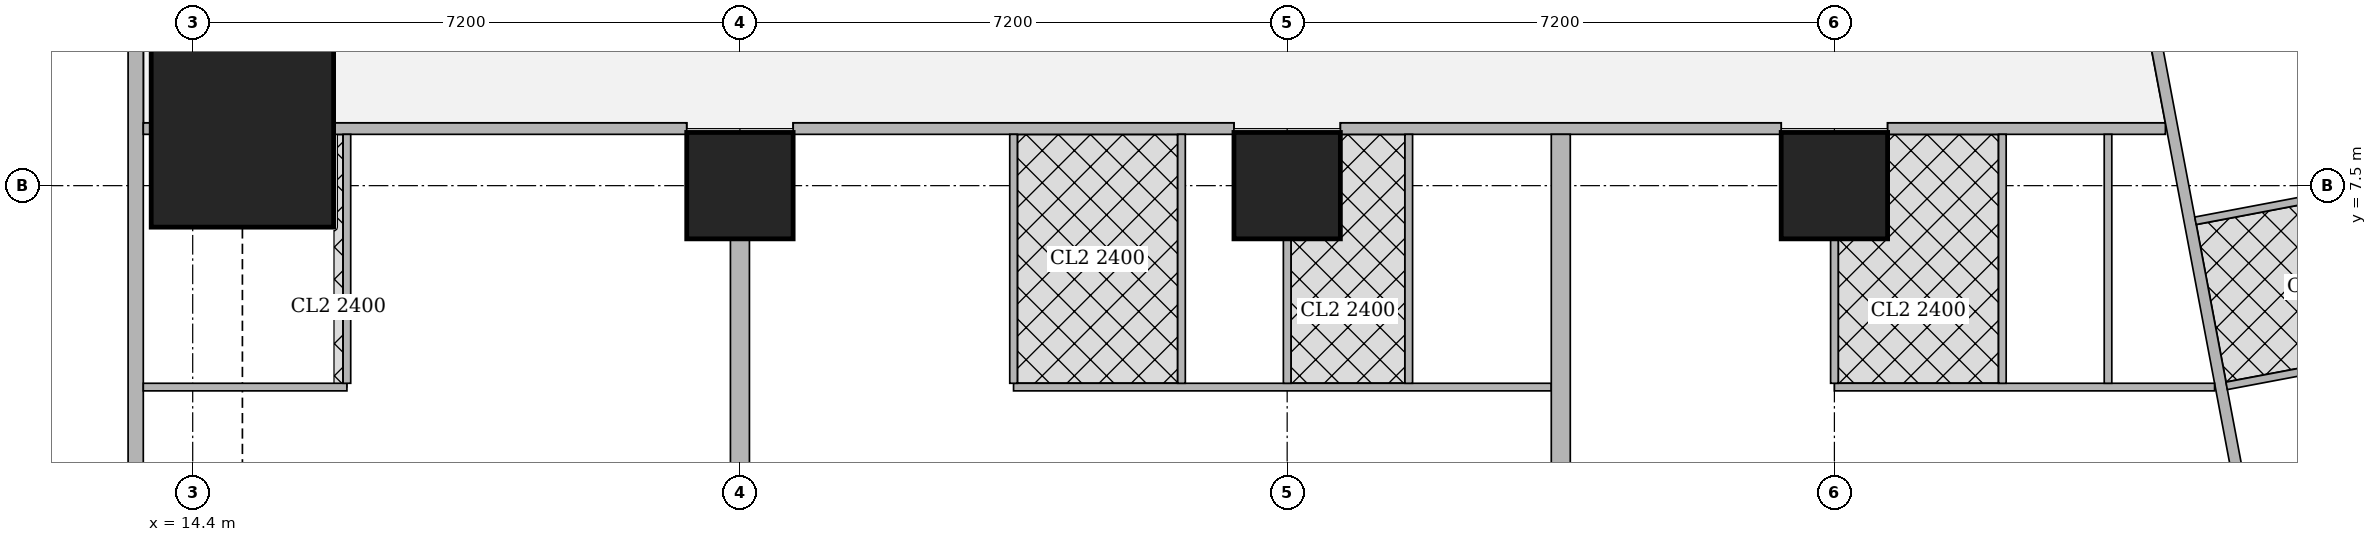
"""IFC4 building model, lengths in metres.
Left out: names, types, materials, properties, quantities, classifications, styles, units other than length and angle.
Written with IfcOpenShell. Run it as: python <this file> out.ifc"""

import sys

from ifc_helpers import new_model, si_unit, direction, frame, frame_2d, origin, origin_2d, place, context, subcontext, project, spatial, rectangle, extrude, element, fill, save


model = new_model("IFC4")
c1 = context("Model", 3, precision=1e-05, world=origin(), true_north=direction((0.0, 1.0)))
c2 = subcontext(c1, "Body", "Model", "MODEL_VIEW")
j1 = project(units=[si_unit("LENGTHUNIT", "METRE"), si_unit("PLANEANGLEUNIT", "RADIAN")], contexts=[c1])
p1 = place(None, origin())
s1 = spatial("IfcSite", under=j1, at=p1, CompositionType="ELEMENT")
p2 = place(p1, origin())
s2 = spatial("IfcBuilding", under=s1, at=p2, CompositionType="ELEMENT")
p3 = place(p2, frame((0.0, 0.0, 234.95)))
s3 = spatial("IfcBuildingStorey", under=s2, at=p3, CompositionType="ELEMENT", Elevation=234.95)
p4 = place(p3, frame((15.054, 8.154, 0.0), z_axis=(0.0, 0.0, 1.0), x_axis=(1.0, 0.0, 0.0)))
e1 = element("IfcColumn", 1, at=p4, inside=s3, PredefinedType="COLUMN", context=c2, shape_type="SweptSolid", body=[
    extrude(rectangle(XDim=2.4, YDim=2.4, at=origin_2d()), origin(), (0.0, 0.0, 1.0), 3.75),
])
for number, where, z_axis, x_axis in (
    (2, (21.6, 7.5, 0.0), (0.0, 0.0, 1.0), (1.0, 0.0, 0.0)),
    (3, (28.8, 7.5, 0.0), (0.0, 0.0, 1.0), (1.0, 0.0, 0.0)),
    (4, (36.0, 7.5, 0.0), (0.0, 0.0, 1.0), (1.0, 0.0, 0.0)),
):
    element("IfcColumn", number, at=place(p3, frame(where, z_axis=z_axis, x_axis=x_axis)), inside=s3, PredefinedType="COLUMN", context=c2, shape_type="SweptSolid", body=[
        extrude(rectangle(XDim=1.4, YDim=1.4, at=origin_2d()), origin(), (0.0, 0.0, 1.0), 3.75),
    ])
p5 = place(p3, frame((13.65, 44.837, 0.0), z_axis=(0.0, 0.0, 1.0), x_axis=(0.0, -1.0, 0.0)))
e5 = element("IfcWall", 5, at=p5, inside=s3, PredefinedType="SOLIDWALL", context=c2, shape_type="SweptSolid", body=[
    extrude(rectangle(XDim=44.674, YDim=0.2, at=frame_2d((22.337, 0.0))), origin(), (0.0, 0.0, 1.0), 3.5),
])
p6 = place(p5, frame((1.889, 0.0, 0.9)))
e6 = element("IfcOpeningElement", 6, at=p6, cuts=e5, PredefinedType="OPENING", context=c2, shape_type="SweptSolid", body=[
    extrude(rectangle(XDim=2.4, YDim=1.5, at=frame_2d((1.2, 0.75))), frame((0.0, 0.11, 0.0), z_axis=(0.0, -1.0, 0.0), x_axis=(1.0, 0.0, 0.0)), (0.0, 0.0, 1.0), 0.22),
])
p7 = place(p5, frame((40.385, 0.0, 0.9)))
e7 = element("IfcOpeningElement", 7, at=p7, cuts=e5, PredefinedType="OPENING", context=c2, shape_type="SweptSolid", body=[
    extrude(rectangle(XDim=2.4, YDim=1.5, at=frame_2d((1.2, 0.75))), frame((0.0, 0.11, 0.0), z_axis=(0.0, -1.0, 0.0), x_axis=(1.0, 0.0, 0.0)), (0.0, 0.0, 1.0), 0.22),
])
p8 = place(p3, frame((40.355, 8.25, 0.0), z_axis=(0.0, 0.0, 1.0), x_axis=(-1.0, 0.0, 0.0)))
e8 = element("IfcWall", 8, at=p8, inside=s3, PredefinedType="SOLIDWALL", context=c2, shape_type="SweptSolid", body=[
    extrude(rectangle(XDim=3.654, YDim=0.15, at=frame_2d((1.827, 0.0))), origin(), (0.0, 0.0, 1.0), 3.5),
])
p9 = place(p3, frame((35.299, 8.25, 0.0), z_axis=(0.0, 0.0, 1.0), x_axis=(-1.0, 0.0, 0.0)))
e9 = element("IfcWall", 9, at=p9, inside=s3, PredefinedType="SOLIDWALL", context=c2, shape_type="SweptSolid", body=[
    extrude(rectangle(XDim=5.798, YDim=0.15, at=frame_2d((2.899, 0.0))), origin(), (0.0, 0.0, 1.0), 3.5),
])
p10 = place(p9, frame((0.728, 0.0, 0.0)))
e10 = element("IfcOpeningElement", 10, at=p10, cuts=e9, PredefinedType="OPENING", context=c2, shape_type="SweptSolid", body=[
    extrude(rectangle(XDim=1.0, YDim=2.1, at=frame_2d((0.5, 1.05))), frame((0.0, 0.085, 0.0), z_axis=(0.0, -1.0, 0.0), x_axis=(1.0, 0.0, 0.0)), (0.0, 0.0, 1.0), 0.17),
])
p11 = place(p3, frame((28.099, 8.25, 0.0), z_axis=(0.0, 0.0, 1.0), x_axis=(-1.0, 0.0, 0.0)))
e11 = element("IfcWall", 11, at=p11, inside=s3, PredefinedType="SOLIDWALL", context=c2, shape_type="SweptSolid", body=[
    extrude(rectangle(XDim=5.798, YDim=0.15, at=frame_2d((2.899, 0.0))), origin(), (0.0, 0.0, 1.0), 3.5),
])
p12 = place(p11, frame((3.999, 0.0, 0.0)))
e12 = element("IfcOpeningElement", 12, at=p12, cuts=e11, PredefinedType="OPENING", context=c2, shape_type="SweptSolid", body=[
    extrude(rectangle(XDim=1.0, YDim=2.1, at=frame_2d((0.5, 1.05))), frame((0.0, 0.085, 0.0), z_axis=(0.0, -1.0, 0.0), x_axis=(1.0, 0.0, 0.0)), (0.0, 0.0, 1.0), 0.17),
])
p13 = place(p3, frame((20.899, 8.25, 0.0), z_axis=(0.0, 0.0, 1.0), x_axis=(-1.0, 0.0, 0.0)))
e13 = element("IfcWall", 13, at=p13, inside=s3, PredefinedType="SOLIDWALL", context=c2, shape_type="SweptSolid", body=[
    extrude(rectangle(XDim=4.644, YDim=0.15, at=frame_2d((2.322, 0.0))), origin(), (0.0, 0.0, 1.0), 3.5),
])
p14 = place(p13, frame((3.27, 0.0, 0.0)))
e14 = element("IfcOpeningElement", 14, at=p14, cuts=e13, PredefinedType="OPENING", context=c2, shape_type="SweptSolid", body=[
    extrude(rectangle(XDim=1.0, YDim=2.1, at=frame_2d((0.5, 1.05))), frame((0.0, 0.085, 0.0), z_axis=(0.0, -1.0, 0.0), x_axis=(1.0, 0.0, 0.0)), (0.0, 0.0, 1.0), 0.17),
])
p15 = place(p3, frame((13.853, 8.25, 0.0), z_axis=(0.0, 0.0, 1.0), x_axis=(-1.0, 0.0, 0.0)))
e15 = element("IfcWall", 15, at=p15, inside=s3, PredefinedType="SOLIDWALL", context=c2, shape_type="SweptSolid", body=[
    extrude(rectangle(XDim=0.103, YDim=0.15, at=frame_2d((0.052, 0.0))), origin(), (0.0, 0.0, 1.0), 3.5),
])
p16 = place(p3, frame((33.933, 42.73, 0.0), z_axis=(0.0, 0.0, 1.0), x_axis=(0.185595417643, -0.982626246825, 0.0)))
e16 = element("IfcWall", 16, at=p16, inside=s3, PredefinedType="SOLIDWALL", context=c2, shape_type="SweptSolid", body=[
    extrude(rectangle(XDim=41.051, YDim=0.15, at=frame_2d((20.525, 0.0))), origin(), (0.0, 0.0, 1.0), 2.5),
])
p17 = place(p16, frame((12.266, 0.0, 0.0)))
e17 = element("IfcOpeningElement", 17, at=p17, cuts=e16, PredefinedType="OPENING", context=c2, shape_type="SweptSolid", body=[
    extrude(rectangle(XDim=1.0, YDim=2.1, at=frame_2d((0.5, 1.05))), frame((0.0, 0.085, 0.0), z_axis=(0.0, -1.0, 0.0), x_axis=(1.0, 0.0, 0.0)), (0.0, 0.0, 1.0), 0.17),
])
p18 = place(p16, frame((16.082, 0.0, 0.0)))
e18 = element("IfcOpeningElement", 18, at=p18, cuts=e16, PredefinedType="OPENING", context=c2, shape_type="SweptSolid", body=[
    extrude(rectangle(XDim=1.0, YDim=2.1, at=frame_2d((0.5, 1.05))), frame((0.0, 0.085, 0.0), z_axis=(0.0, -1.0, 0.0), x_axis=(1.0, 0.0, 0.0)), (0.0, 0.0, 1.0), 0.17),
])
p19 = place(p16, frame((30.862, 0.0, 0.0)))
e19 = element("IfcOpeningElement", 19, at=p19, cuts=e16, PredefinedType="OPENING", context=c2, shape_type="SweptSolid", body=[
    extrude(rectangle(XDim=1.0, YDim=2.1, at=frame_2d((0.5, 1.05))), frame((0.0, 0.085, 0.0), z_axis=(0.0, -1.0, 0.0), x_axis=(1.0, 0.0, 0.0)), (0.0, 0.0, 1.0), 0.17),
])
p20 = place(p3, frame((16.429, 4.85, 0.0), z_axis=(0.0, 0.0, 1.0), x_axis=(-1.0, 0.0, 0.0)))
e20 = element("IfcWall", 20, at=p20, inside=s3, PredefinedType="PARTITIONING", context=c2, shape_type="SweptSolid", body=[
    extrude(rectangle(XDim=2.679, YDim=0.1, at=frame_2d((1.339, 0.0))), origin(), (0.0, 0.0, 1.0), 2.05),
])
p21 = place(p3, frame((16.429, 4.9, 0.0), z_axis=(0.0, 0.0, 1.0), x_axis=(0.0, 1.0, 0.0)))
e21 = element("IfcWall", 21, at=p21, inside=s3, PredefinedType="PARTITIONING", context=c2, shape_type="SweptSolid", body=[
    extrude(rectangle(XDim=3.275, YDim=0.1, at=frame_2d((1.638, 0.0))), origin(), (0.0, 0.0, 1.0), 3.5),
])
p22 = place(p21, frame((0.6, 0.0, 0.0)))
e22 = element("IfcOpeningElement", 22, at=p22, cuts=e21, PredefinedType="OPENING", context=c2, shape_type="SweptSolid", body=[
    extrude(rectangle(XDim=0.9, YDim=2.1, at=frame_2d((0.45, 1.05))), frame((0.0, 0.06, 0.0), z_axis=(0.0, -1.0, 0.0), x_axis=(1.0, 0.0, 0.0)), (0.0, 0.0, 1.0), 0.12),
])
p23 = place(p3, frame((32.275, 4.85, 0.0), z_axis=(0.0, 0.0, 1.0), x_axis=(-1.0, 0.0, 0.0)))
e23 = element("IfcWall", 23, at=p23, inside=s3, PredefinedType="PARTITIONING", context=c2, shape_type="SweptSolid", body=[
    extrude(rectangle(XDim=7.075, YDim=0.1, at=frame_2d((3.538, 0.0))), origin(), (0.0, 0.0, 1.0), 3.5),
])
p24 = place(p23, frame((5.52, 0.0, 0.0)))
e24 = element("IfcOpeningElement", 24, at=p24, cuts=e23, PredefinedType="OPENING", context=c2, shape_type="SweptSolid", body=[
    extrude(rectangle(XDim=0.9, YDim=2.1, at=frame_2d((0.45, 1.05))), frame((0.0, 0.06, 0.0), z_axis=(0.0, -1.0, 0.0), x_axis=(1.0, 0.0, 0.0)), (0.0, 0.0, 1.0), 0.12),
])
p25 = place(p23, frame((2.225, 0.0, 0.0)))
e25 = element("IfcOpeningElement", 25, at=p25, cuts=e23, PredefinedType="OPENING", context=c2, shape_type="SweptSolid", body=[
    extrude(rectangle(XDim=0.9, YDim=2.1, at=frame_2d((0.45, 1.05))), frame((0.0, 0.06, 0.0), z_axis=(0.0, -1.0, 0.0), x_axis=(1.0, 0.0, 0.0)), (0.0, 0.0, 1.0), 0.12),
])
p26 = place(p23, frame((3.72, 0.0, 0.0)))
e26 = element("IfcOpeningElement", 26, at=p26, cuts=e23, PredefinedType="OPENING", context=c2, shape_type="SweptSolid", body=[
    extrude(rectangle(XDim=0.9, YDim=2.1, at=frame_2d((0.45, 1.05))), frame((0.0, 0.06, 0.0), z_axis=(0.0, -1.0, 0.0), x_axis=(1.0, 0.0, 0.0)), (0.0, 0.0, 1.0), 0.12),
])
p27 = place(p23, frame((0.425, 0.0, 0.0)))
e27 = element("IfcOpeningElement", 27, at=p27, cuts=e23, PredefinedType="OPENING", context=c2, shape_type="SweptSolid", body=[
    extrude(rectangle(XDim=0.9, YDim=2.1, at=frame_2d((0.45, 1.05))), frame((0.0, 0.06, 0.0), z_axis=(0.0, -1.0, 0.0), x_axis=(1.0, 0.0, 0.0)), (0.0, 0.0, 1.0), 0.12),
])
p28 = place(p3, frame((25.2, 4.9, 0.0), z_axis=(0.0, 0.0, 1.0), x_axis=(0.0, 1.0, 0.0)))
e28 = element("IfcWall", 28, at=p28, inside=s3, PredefinedType="PARTITIONING", context=c2, shape_type="SweptSolid", body=[
    extrude(rectangle(XDim=3.275, YDim=0.1, at=frame_2d((1.638, 0.0))), origin(), (0.0, 0.0, 1.0), 3.5),
])
p29 = place(p3, frame((28.8, 4.9, 0.0), z_axis=(0.0, 0.0, 1.0), x_axis=(0.0, 1.0, 0.0)))
e29 = element("IfcWall", 29, at=p29, inside=s3, PredefinedType="PARTITIONING", context=c2, shape_type="SweptSolid", body=[
    extrude(rectangle(XDim=1.899, YDim=0.1, at=frame_2d((0.95, 0.0))), origin(), (0.0, 0.0, 1.0), 3.5),
])
for number, where, z_axis, x_axis in (
    (30, (27.41, 4.9, 0.0), (0.0, 0.0, 1.0), (0.0, 1.0, 0.0)),
    (31, (30.4, 4.9, 0.0), (0.0, 0.0, 1.0), (0.0, 1.0, 0.0)),
):
    element("IfcWall", number, at=place(p3, frame(where, z_axis=z_axis, x_axis=x_axis)), inside=s3, PredefinedType="PARTITIONING", context=c2, shape_type="SweptSolid", body=[
        extrude(rectangle(XDim=3.275, YDim=0.1, at=frame_2d((1.638, 0.0))), origin(), (0.0, 0.0, 1.0), 3.5),
    ])
p30 = place(p3, frame((21.6, 3.65, 0.0), z_axis=(0.0, 0.0, 1.0), x_axis=(0.0, 1.0, 0.0)))
e32 = element("IfcWall", 32, at=p30, inside=s3, PredefinedType="SOLIDWALL", context=c2, shape_type="SweptSolid", body=[
    extrude(rectangle(XDim=3.149, YDim=0.25, at=frame_2d((1.575, 0.0))), origin(), (0.0, 0.0, 1.0), 3.5),
])
p31 = place(p3, frame((41.002, 4.85, 0.0), z_axis=(0.0, 0.0, 1.0), x_axis=(-1.0, 0.0, 0.0)))
e33 = element("IfcWall", 33, at=p31, inside=s3, PredefinedType="PARTITIONING", context=c2, shape_type="SweptSolid", body=[
    extrude(rectangle(XDim=5.002, YDim=0.1, at=frame_2d((2.501, 0.0))), origin(), (0.0, 0.0, 1.0), 3.5),
])
p32 = place(p31, frame((3.447, 0.0, 0.0)))
e34 = element("IfcOpeningElement", 34, at=p32, cuts=e33, PredefinedType="OPENING", context=c2, shape_type="SweptSolid", body=[
    extrude(rectangle(XDim=0.9, YDim=2.1, at=frame_2d((0.45, 1.05))), frame((0.0, 0.06, 0.0), z_axis=(0.0, -1.0, 0.0), x_axis=(1.0, 0.0, 0.0)), (0.0, 0.0, 1.0), 0.12),
])
p33 = place(p31, frame((0.15, 0.0, 0.0)))
e35 = element("IfcOpeningElement", 35, at=p33, cuts=e33, PredefinedType="OPENING", context=c2, shape_type="SweptSolid", body=[
    extrude(rectangle(XDim=0.9, YDim=2.1, at=frame_2d((0.45, 1.05))), frame((0.0, 0.06, 0.0), z_axis=(0.0, -1.0, 0.0), x_axis=(1.0, 0.0, 0.0)), (0.0, 0.0, 1.0), 0.12),
])
p34 = place(p31, frame((1.647, 0.0, 0.0)))
e36 = element("IfcOpeningElement", 36, at=p34, cuts=e33, PredefinedType="OPENING", context=c2, shape_type="SweptSolid", body=[
    extrude(rectangle(XDim=0.9, YDim=2.1, at=frame_2d((0.45, 1.05))), frame((0.0, 0.06, 0.0), z_axis=(0.0, -1.0, 0.0), x_axis=(1.0, 0.0, 0.0)), (0.0, 0.0, 1.0), 0.12),
])
p35 = place(p3, frame((36.0, 4.9, 0.0), z_axis=(0.0, 0.0, 1.0), x_axis=(0.0, 1.0, 0.0)))
e37 = element("IfcWall", 37, at=p35, inside=s3, PredefinedType="PARTITIONING", context=c2, shape_type="SweptSolid", body=[
    extrude(rectangle(XDim=1.899, YDim=0.1, at=frame_2d((0.95, 0.0))), origin(), (0.0, 0.0, 1.0), 3.5),
])
for number, where, z_axis, x_axis in (
    (38, (39.6, 4.9, 0.0), (0.0, 0.0, 1.0), (0.0, 1.0, 0.0)),
    (39, (38.21, 4.9, 0.0), (0.0, 0.0, 1.0), (0.0, 1.0, 0.0)),
):
    element("IfcWall", number, at=place(p3, frame(where, z_axis=z_axis, x_axis=x_axis)), inside=s3, PredefinedType="PARTITIONING", context=c2, shape_type="SweptSolid", body=[
        extrude(rectangle(XDim=3.275, YDim=0.1, at=frame_2d((1.638, 0.0))), origin(), (0.0, 0.0, 1.0), 3.5),
    ])
p36 = place(p3, frame((32.4, 3.65, 0.0), z_axis=(0.0, 0.0, 1.0), x_axis=(0.0, 1.0, 0.0)))
e40 = element("IfcWall", 40, at=p36, inside=s3, PredefinedType="SOLIDWALL", context=c2, shape_type="SweptSolid", body=[
    extrude(rectangle(XDim=4.525, YDim=0.25, at=frame_2d((2.263, 0.0))), origin(), (0.0, 0.0, 1.0), 3.5),
])
p37 = place(p3, frame((42.49, 7.367, 0.0), z_axis=(0.0, 0.0, 1.0), x_axis=(-0.982585223885, -0.185812480215, 0.0)))
e41 = element("IfcWall", 41, at=p37, inside=s3, PredefinedType="PARTITIONING", context=c2, shape_type="SweptSolid", body=[
    extrude(rectangle(XDim=1.77, YDim=0.1, at=frame_2d((0.885, 0.0))), origin(), (0.0, 0.0, 1.0), 3.5),
])
p38 = place(p3, frame((44.379, 5.474, 0.0), z_axis=(0.0, 0.0, 1.0), x_axis=(-0.982607026909, -0.185697147715, 0.0)))
e42 = element("IfcWall", 42, at=p38, inside=s3, PredefinedType="PARTITIONING", context=c2, shape_type="SweptSolid", body=[
    extrude(rectangle(XDim=3.275, YDim=0.1, at=frame_2d((1.637, 0.0))), origin(), (0.0, 0.0, 1.0), 3.5),
])
p39 = place(p7, origin())
e43 = element("IfcWindow", 43, at=p39, inside=s3, PartitioningType="SINGLE_PANEL", PredefinedType="WINDOW", context=c2, shape_type="SweptSolid", body=[
    extrude(rectangle(XDim=2.4, YDim=1.5, at=frame_2d((1.2, 0.75))), frame((0.0, 0.03, 0.0), z_axis=(0.0, -1.0, 0.0), x_axis=(1.0, 0.0, 0.0)), (0.0, 0.0, 1.0), 0.06),
])
fill(e7, e43)
p40 = place(p22, origin())
e44 = element("IfcDoor", 44, at=p40, inside=s3, OperationType="SINGLE_SWING_RIGHT", PredefinedType="DOOR", context=c2, shape_type="SweptSolid", body=[
    extrude(rectangle(XDim=0.9, YDim=2.1, at=frame_2d((0.45, 1.05))), frame((0.0, 0.025, 0.0), z_axis=(0.0, -1.0, 0.0), x_axis=(1.0, 0.0, 0.0)), (0.0, 0.0, 1.0), 0.05),
])
fill(e22, e44)
p41 = place(p14, origin())
e45 = element("IfcDoor", 45, at=p41, inside=s3, OperationType="SINGLE_SWING_LEFT", PredefinedType="DOOR", context=c2, shape_type="SweptSolid", body=[
    extrude(rectangle(XDim=1.0, YDim=2.1, at=frame_2d((0.5, 1.05))), frame((0.0, 0.025, 0.0), z_axis=(0.0, -1.0, 0.0), x_axis=(1.0, 0.0, 0.0)), (0.0, 0.0, 1.0), 0.05),
])
fill(e14, e45)
p42 = place(p24, origin())
e46 = element("IfcDoor", 46, at=p42, inside=s3, OperationType="SINGLE_SWING_LEFT", PredefinedType="DOOR", context=c2, shape_type="SweptSolid", body=[
    extrude(rectangle(XDim=0.9, YDim=2.1, at=frame_2d((0.45, 1.05))), frame((0.0, 0.025, 0.0), z_axis=(0.0, -1.0, 0.0), x_axis=(1.0, 0.0, 0.0)), (0.0, 0.0, 1.0), 0.05),
])
fill(e24, e46)
p43 = place(p25, origin())
e47 = element("IfcDoor", 47, at=p43, inside=s3, OperationType="SINGLE_SWING_RIGHT", PredefinedType="DOOR", context=c2, shape_type="SweptSolid", body=[
    extrude(rectangle(XDim=0.9, YDim=2.1, at=frame_2d((0.45, 1.05))), frame((0.0, 0.025, 0.0), z_axis=(0.0, -1.0, 0.0), x_axis=(1.0, 0.0, 0.0)), (0.0, 0.0, 1.0), 0.05),
])
fill(e25, e47)
p44 = place(p26, origin())
e48 = element("IfcDoor", 48, at=p44, inside=s3, OperationType="SINGLE_SWING_RIGHT", PredefinedType="DOOR", context=c2, shape_type="SweptSolid", body=[
    extrude(rectangle(XDim=0.9, YDim=2.1, at=frame_2d((0.45, 1.05))), frame((0.0, 0.025, 0.0), z_axis=(0.0, -1.0, 0.0), x_axis=(1.0, 0.0, 0.0)), (0.0, 0.0, 1.0), 0.05),
])
fill(e26, e48)
p45 = place(p27, origin())
e49 = element("IfcDoor", 49, at=p45, inside=s3, OperationType="SINGLE_SWING_RIGHT", PredefinedType="DOOR", context=c2, shape_type="SweptSolid", body=[
    extrude(rectangle(XDim=0.9, YDim=2.1, at=frame_2d((0.45, 1.05))), frame((0.0, 0.025, 0.0), z_axis=(0.0, -1.0, 0.0), x_axis=(1.0, 0.0, 0.0)), (0.0, 0.0, 1.0), 0.05),
])
fill(e27, e49)
p46 = place(p12, origin())
e50 = element("IfcDoor", 50, at=p46, inside=s3, OperationType="SINGLE_SWING_RIGHT", PredefinedType="DOOR", context=c2, shape_type="SweptSolid", body=[
    extrude(rectangle(XDim=1.0, YDim=2.1, at=frame_2d((0.5, 1.05))), frame((0.0, 0.025, 0.0), z_axis=(0.0, -1.0, 0.0), x_axis=(1.0, 0.0, 0.0)), (0.0, 0.0, 1.0), 0.05),
])
fill(e12, e50)
p47 = place(p32, origin())
e51 = element("IfcDoor", 51, at=p47, inside=s3, OperationType="SINGLE_SWING_LEFT", PredefinedType="DOOR", context=c2, shape_type="SweptSolid", body=[
    extrude(rectangle(XDim=0.9, YDim=2.1, at=frame_2d((0.45, 1.05))), frame((0.0, 0.025, 0.0), z_axis=(0.0, -1.0, 0.0), x_axis=(1.0, 0.0, 0.0)), (0.0, 0.0, 1.0), 0.05),
])
fill(e34, e51)
p48 = place(p33, origin())
e52 = element("IfcDoor", 52, at=p48, inside=s3, OperationType="SINGLE_SWING_RIGHT", PredefinedType="DOOR", context=c2, shape_type="SweptSolid", body=[
    extrude(rectangle(XDim=0.9, YDim=2.1, at=frame_2d((0.45, 1.05))), frame((0.0, 0.025, 0.0), z_axis=(0.0, -1.0, 0.0), x_axis=(1.0, 0.0, 0.0)), (0.0, 0.0, 1.0), 0.05),
])
fill(e35, e52)
p49 = place(p34, origin())
e53 = element("IfcDoor", 53, at=p49, inside=s3, OperationType="SINGLE_SWING_LEFT", PredefinedType="DOOR", context=c2, shape_type="SweptSolid", body=[
    extrude(rectangle(XDim=0.9, YDim=2.1, at=frame_2d((0.45, 1.05))), frame((0.0, 0.025, 0.0), z_axis=(0.0, -1.0, 0.0), x_axis=(1.0, 0.0, 0.0)), (0.0, 0.0, 1.0), 0.05),
])
fill(e36, e53)
p50 = place(p10, origin())
e54 = element("IfcDoor", 54, at=p50, inside=s3, OperationType="SINGLE_SWING_LEFT", PredefinedType="DOOR", context=c2, shape_type="SweptSolid", body=[
    extrude(rectangle(XDim=1.0, YDim=2.1, at=frame_2d((0.5, 1.05))), frame((0.0, 0.025, 0.0), z_axis=(0.0, -1.0, 0.0), x_axis=(1.0, 0.0, 0.0)), (0.0, 0.0, 1.0), 0.05),
])
fill(e10, e54)
save(model, sys.argv[1])
